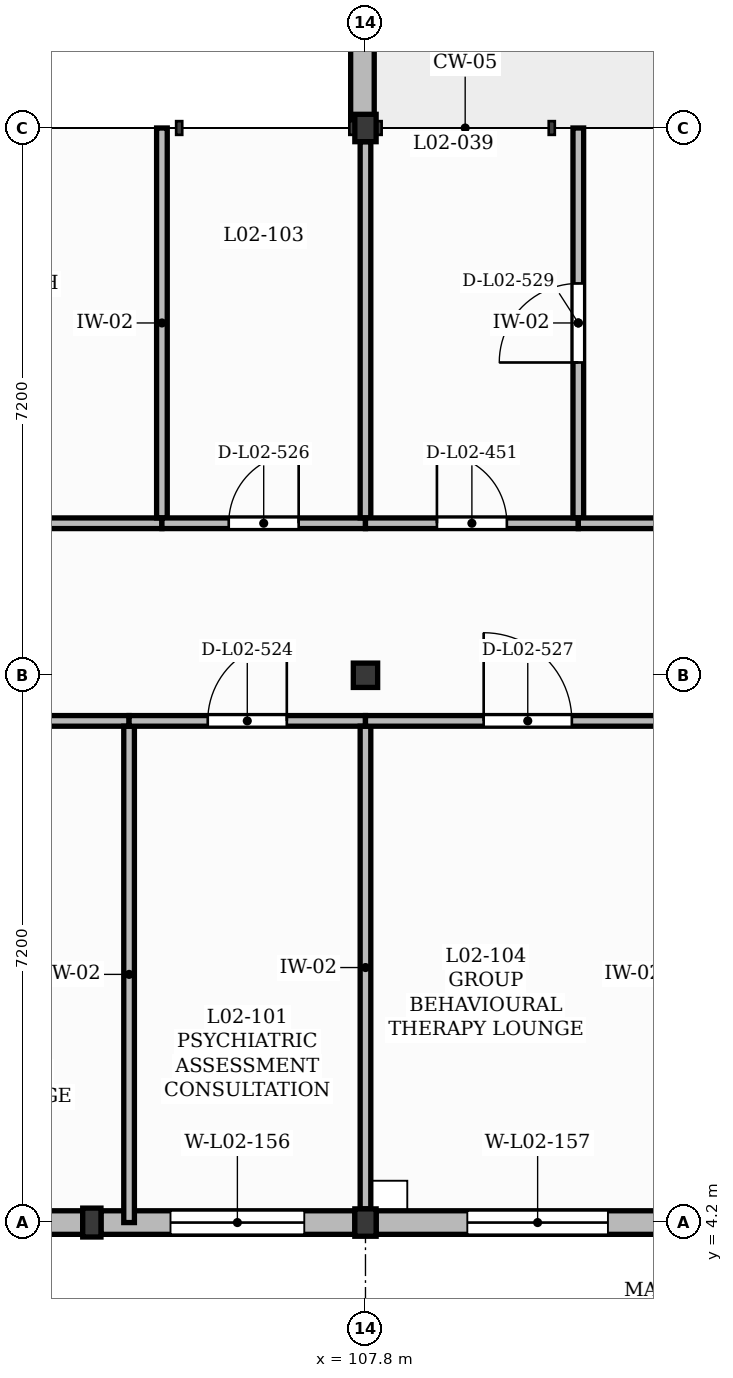
"""IFC4 building model, lengths in metres.
Left out: names, types, materials, properties, quantities, classifications, styles, units other than length and angle.
Written with IfcOpenShell. Run it as: python <this file> out.ifc"""

import sys

from ifc_helpers import new_model, si_unit, direction, frame, frame_2d, origin, origin_2d, place, context, subcontext, project, spatial, polyline, rectangle, outline, extrude, element, fill, save


model = new_model("IFC4")
c1 = context("Model", 3, precision=1e-05, world=origin(), true_north=direction((0.0, 1.0)))
c2 = subcontext(c1, "Body", "Model", "MODEL_VIEW")
j1 = project(units=[si_unit("LENGTHUNIT", "METRE"), si_unit("PLANEANGLEUNIT", "RADIAN")], contexts=[c1])
p1 = place(None, origin())
s1 = spatial("IfcSite", under=j1, at=p1, CompositionType="ELEMENT")
p2 = place(p1, origin())
s2 = spatial("IfcBuilding", under=s1, at=p2, CompositionType="ELEMENT")
p3 = place(p2, frame((0.0, 0.0, 9.0)))
s3 = spatial("IfcBuildingStorey", under=s2, at=p3, CompositionType="ELEMENT", Elevation=9.0)
p4 = place(p3, frame((107.8, 4.2, 0.0), z_axis=(0.0, 0.0, 1.0), x_axis=(1.0, 0.0, 0.0)))
e1 = element("IfcColumn", 1, at=p4, inside=s3, PredefinedType="COLUMN", context=c2, shape_type="SweptSolid", body=[
    extrude(rectangle(XDim=0.28, YDim=0.36, at=origin_2d()), origin(), (0.0, 0.0, 1.0), 3.98),
])
p5 = place(p3, frame((107.8, 11.4, 0.0), z_axis=(0.0, 0.0, 1.0), x_axis=(1.0, 0.0, 0.0)))
e2 = element("IfcColumn", 2, at=p5, inside=s3, PredefinedType="COLUMN", context=c2, shape_type="SweptSolid", body=[
    extrude(rectangle(XDim=0.32, YDim=0.32, at=origin_2d()), origin(), (0.0, 0.0, 1.0), 3.98),
])
p6 = place(p3, frame((107.8, 18.6, 0.0), z_axis=(0.0, 0.0, 1.0), x_axis=(1.0, 0.0, 0.0)))
e3 = element("IfcColumn", 3, at=p6, inside=s3, PredefinedType="COLUMN", context=c2, shape_type="SweptSolid", body=[
    extrude(rectangle(XDim=0.28, YDim=0.36, at=origin_2d()), origin(), (0.0, 0.0, 1.0), 3.98),
])
p7 = place(p3, frame((104.2, 4.2, 0.0), z_axis=(0.0, 0.0, 1.0), x_axis=(1.0, 0.0, 0.0)))
e4 = element("IfcColumn", 4, at=p7, inside=s3, PredefinedType="PILASTER", context=c2, shape_type="SweptSolid", body=[
    extrude(rectangle(XDim=0.24, YDim=0.38, at=origin_2d()), origin(), (0.0, 0.0, 1.0), 3.99),
])
p8 = place(p3, frame((100.76, 4.2, 0.0), z_axis=(0.0, 0.0, 1.0), x_axis=(1.0, 0.0, 0.0)))
e5 = element("IfcWall", 5, at=p8, inside=s3, PredefinedType="SOLIDWALL", context=c2, shape_type="SweptSolid", body=[
    extrude(rectangle(XDim=3.32, YDim=0.31, at=frame_2d((1.66, 0.0))), origin(), (0.0, 0.0, 1.0), 3.52),
])
p9 = place(p8, frame((0.85, 0.0, 1.0)))
e6 = element("IfcOpeningElement", 6, at=p9, cuts=e5, PredefinedType="OPENING", context=c2, shape_type="SweptSolid", body=[
    extrude(rectangle(XDim=1.62, YDim=1.95, at=frame_2d((0.81, 0.975))), frame((0.0, 0.165, 0.0), z_axis=(0.0, -1.0, 0.0), x_axis=(1.0, 0.0, 0.0)), (0.0, 0.0, 1.0), 0.33),
])
p10 = place(p3, frame((104.32, 4.2, 0.0), z_axis=(0.0, 0.0, 1.0), x_axis=(1.0, 0.0, 0.0)))
e7 = element("IfcWall", 7, at=p10, inside=s3, PredefinedType="SOLIDWALL", context=c2, shape_type="SweptSolid", body=[
    extrude(rectangle(XDim=3.34, YDim=0.31, at=frame_2d((1.67, 0.0))), origin(), (0.0, 0.0, 1.0), 3.52),
])
p11 = place(p10, frame((0.915, 0.0, 1.0)))
e8 = element("IfcOpeningElement", 8, at=p11, cuts=e7, PredefinedType="OPENING", context=c2, shape_type="SweptSolid", body=[
    extrude(rectangle(XDim=1.76, YDim=1.95, at=frame_2d((0.88, 0.975))), frame((0.0, 0.165, 0.0), z_axis=(0.0, -1.0, 0.0), x_axis=(1.0, 0.0, 0.0)), (0.0, 0.0, 1.0), 0.33),
])
p12 = place(p3, frame((107.94, 4.2, 0.0), z_axis=(0.0, 0.0, 1.0), x_axis=(1.0, 0.0, 0.0)))
e9 = element("IfcWall", 9, at=p12, inside=s3, PredefinedType="SOLIDWALL", context=c2, shape_type="SweptSolid", body=[
    extrude(rectangle(XDim=6.9, YDim=0.31, at=frame_2d((3.45, 0.0))), origin(), (0.0, 0.0, 1.0), 3.52),
])
p13 = place(p12, frame((1.2, 0.0, 1.5)))
e10 = element("IfcOpeningElement", 10, at=p13, cuts=e9, PredefinedType="OPENING", context=c2, shape_type="SweptSolid", body=[
    extrude(rectangle(XDim=1.85, YDim=1.25, at=frame_2d((0.925, 0.625))), frame((0.0, 0.165, 0.0), z_axis=(0.0, -1.0, 0.0), x_axis=(1.0, 0.0, 0.0)), (0.0, 0.0, 1.0), 0.33),
])
p14 = place(p12, frame((4.88, 0.0, 1.5)))
e11 = element("IfcOpeningElement", 11, at=p14, cuts=e9, PredefinedType="OPENING", context=c2, shape_type="SweptSolid", body=[
    extrude(rectangle(XDim=1.15, YDim=1.25, at=frame_2d((0.575, 0.625))), frame((0.0, 0.165, 0.0), z_axis=(0.0, -1.0, 0.0), x_axis=(1.0, 0.0, 0.0)), (0.0, 0.0, 1.0), 0.33),
])
p15 = place(p3, frame((107.76, 18.6, 0.0), z_axis=(0.0, 0.0, 1.0), x_axis=(0.0, 1.0, 0.0)))
e12 = element("IfcWall", 12, at=p15, inside=s3, PredefinedType="SOLIDWALL", context=c2, shape_type="SweptSolid", body=[
    extrude(outline(polyline([(0.0, 0.0), (8.6, 0.0), (8.6, 0.05), (4.3, 1.52), (0.0, 0.05), (0.0, 0.0)])), frame((0.0, 0.155, 0.0), z_axis=(0.0, -1.0, 0.0), x_axis=(1.0, 0.0, 0.0)), (0.0, 0.0, 1.0), 0.31),
])
p16 = place(p3, frame((100.6, 10.8, 0.0), z_axis=(0.0, 0.0, 1.0), x_axis=(1.0, 0.0, 0.0)))
e13 = element("IfcWall", 13, at=p16, inside=s3, PredefinedType="PARTITIONING", context=c2, shape_type="SweptSolid", body=[
    extrude(rectangle(XDim=4.09, YDim=0.14, at=frame_2d((2.045, 0.0))), origin(), (0.0, 0.0, 1.0), 3.96),
])
p17 = place(p16, frame((1.145, 0.0, 0.0)))
e14 = element("IfcOpeningElement", 14, at=p17, cuts=e13, PredefinedType="OPENING", context=c2, shape_type="SweptSolid", body=[
    extrude(rectangle(XDim=1.8, YDim=2.3, at=frame_2d((0.9, 1.15))), frame((0.0, 0.08, 0.0), z_axis=(0.0, -1.0, 0.0), x_axis=(1.0, 0.0, 0.0)), (0.0, 0.0, 1.0), 0.16),
])
p18 = place(p3, frame((100.6, 13.4, 0.0), z_axis=(0.0, 0.0, 1.0), x_axis=(1.0, 0.0, 0.0)))
e15 = element("IfcWall", 15, at=p18, inside=s3, PredefinedType="PARTITIONING", context=c2, shape_type="SweptSolid", body=[
    extrude(rectangle(XDim=4.522, YDim=0.14, at=frame_2d((2.261, 0.0))), origin(), (0.0, 0.0, 1.0), 3.96),
])
p19 = place(p18, frame((1.701, 0.0, 0.0)))
e16 = element("IfcOpeningElement", 16, at=p19, cuts=e15, PredefinedType="OPENING", context=c2, shape_type="SweptSolid", body=[
    extrude(rectangle(XDim=1.12, YDim=2.15, at=frame_2d((0.56, 1.075))), frame((0.0, 0.08, 0.0), z_axis=(0.0, -1.0, 0.0), x_axis=(1.0, 0.0, 0.0)), (0.0, 0.0, 1.0), 0.16),
])
p20 = place(p3, frame((104.69, 4.2, 0.0), z_axis=(0.0, 0.0, 1.0), x_axis=(0.0, 1.0, 0.0)))
e17 = element("IfcWall", 17, at=p20, inside=s3, PredefinedType="PARTITIONING", context=c2, shape_type="SweptSolid", body=[
    extrude(rectangle(XDim=6.53, YDim=0.14, at=frame_2d((3.265, 0.0))), origin(), (0.0, 0.0, 1.0), 3.96),
])
p21 = place(p3, frame((104.69, 10.8, 0.0), z_axis=(0.0, 0.0, 1.0), x_axis=(1.0, 0.0, 0.0)))
e18 = element("IfcWall", 18, at=p21, inside=s3, PredefinedType="PARTITIONING", context=c2, shape_type="SweptSolid", body=[
    extrude(rectangle(XDim=3.11, YDim=0.14, at=frame_2d((1.555, 0.0))), origin(), (0.0, 0.0, 1.0), 3.96),
])
p22 = place(p21, frame((1.035, 0.0, 0.0)))
e19 = element("IfcOpeningElement", 19, at=p22, cuts=e18, PredefinedType="OPENING", context=c2, shape_type="SweptSolid", body=[
    extrude(rectangle(XDim=1.04, YDim=2.1, at=frame_2d((0.52, 1.05))), frame((0.0, 0.08, 0.0), z_axis=(0.0, -1.0, 0.0), x_axis=(1.0, 0.0, 0.0)), (0.0, 0.0, 1.0), 0.16),
])
p23 = place(p3, frame((105.122, 13.47, 0.0), z_axis=(0.0, 0.0, 1.0), x_axis=(0.0, 1.0, 0.0)))
e20 = element("IfcWall", 20, at=p23, inside=s3, PredefinedType="PARTITIONING", context=c2, shape_type="SweptSolid", body=[
    extrude(rectangle(XDim=5.13, YDim=0.14, at=frame_2d((2.565, 0.0))), origin(), (0.0, 0.0, 1.0), 3.96),
])
p24 = place(p3, frame((105.122, 13.4, 0.0), z_axis=(0.0, 0.0, 1.0), x_axis=(1.0, 0.0, 0.0)))
e21 = element("IfcWall", 21, at=p24, inside=s3, PredefinedType="PARTITIONING", context=c2, shape_type="SweptSolid", body=[
    extrude(rectangle(XDim=2.678, YDim=0.14, at=frame_2d((1.339, 0.0))), origin(), (0.0, 0.0, 1.0), 3.96),
])
p25 = place(p24, frame((0.879, 0.0, 0.0)))
e22 = element("IfcOpeningElement", 22, at=p25, cuts=e21, PredefinedType="OPENING", context=c2, shape_type="SweptSolid", body=[
    extrude(rectangle(XDim=0.92, YDim=2.1, at=frame_2d((0.46, 1.05))), frame((0.0, 0.08, 0.0), z_axis=(0.0, -1.0, 0.0), x_axis=(1.0, 0.0, 0.0)), (0.0, 0.0, 1.0), 0.16),
])
p26 = place(p3, frame((107.8, 4.38, 0.0), z_axis=(0.0, 0.0, 1.0), x_axis=(0.0, 1.0, 0.0)))
e23 = element("IfcWall", 23, at=p26, inside=s3, PredefinedType="PARTITIONING", context=c2, shape_type="SweptSolid", body=[
    extrude(rectangle(XDim=6.35, YDim=0.14, at=frame_2d((3.175, 0.0))), origin(), (0.0, 0.0, 1.0), 3.52),
])
p27 = place(p3, frame((107.8, 10.8, 0.0), z_axis=(0.0, 0.0, 1.0), x_axis=(1.0, 0.0, 0.0)))
e24 = element("IfcWall", 24, at=p27, inside=s3, PredefinedType="PARTITIONING", context=c2, shape_type="SweptSolid", body=[
    extrude(rectangle(XDim=4.27, YDim=0.14, at=frame_2d((2.135, 0.0))), origin(), (0.0, 0.0, 1.0), 3.96),
])
p28 = place(p27, frame((1.555, 0.0, 0.0)))
e25 = element("IfcOpeningElement", 25, at=p28, cuts=e24, PredefinedType="OPENING", context=c2, shape_type="SweptSolid", body=[
    extrude(rectangle(XDim=1.16, YDim=2.1, at=frame_2d((0.58, 1.05))), frame((0.0, 0.08, 0.0), z_axis=(0.0, -1.0, 0.0), x_axis=(1.0, 0.0, 0.0)), (0.0, 0.0, 1.0), 0.16),
])
p29 = place(p3, frame((107.8, 13.47, 0.0), z_axis=(0.0, 0.0, 1.0), x_axis=(0.0, 1.0, 0.0)))
e26 = element("IfcWall", 26, at=p29, inside=s3, PredefinedType="PARTITIONING", context=c2, shape_type="SweptSolid", body=[
    extrude(rectangle(XDim=4.95, YDim=0.14, at=frame_2d((2.475, 0.0))), origin(), (0.0, 0.0, 1.0), 3.52),
])
p30 = place(p3, frame((107.8, 13.4, 0.0), z_axis=(0.0, 0.0, 1.0), x_axis=(1.0, 0.0, 0.0)))
e27 = element("IfcWall", 27, at=p30, inside=s3, PredefinedType="PARTITIONING", context=c2, shape_type="SweptSolid", body=[
    extrude(rectangle(XDim=2.8, YDim=0.14, at=frame_2d((1.4, 0.0))), origin(), (0.0, 0.0, 1.0), 3.96),
])
p31 = place(p30, frame((0.94, 0.0, 0.0)))
e28 = element("IfcOpeningElement", 28, at=p31, cuts=e27, PredefinedType="OPENING", context=c2, shape_type="SweptSolid", body=[
    extrude(rectangle(XDim=0.92, YDim=2.1, at=frame_2d((0.46, 1.05))), frame((0.0, 0.08, 0.0), z_axis=(0.0, -1.0, 0.0), x_axis=(1.0, 0.0, 0.0)), (0.0, 0.0, 1.0), 0.16),
])
p32 = place(p3, frame((110.6, 13.47, 0.0), z_axis=(0.0, 0.0, 1.0), x_axis=(0.0, 1.0, 0.0)))
e29 = element("IfcWall", 29, at=p32, inside=s3, PredefinedType="PARTITIONING", context=c2, shape_type="SweptSolid", body=[
    extrude(rectangle(XDim=5.13, YDim=0.14, at=frame_2d((2.565, 0.0))), origin(), (0.0, 0.0, 1.0), 3.96),
])
p33 = place(p32, frame((2.045, 0.0, 0.0)))
e30 = element("IfcOpeningElement", 30, at=p33, cuts=e29, PredefinedType="OPENING", context=c2, shape_type="SweptSolid", body=[
    extrude(rectangle(XDim=1.04, YDim=2.1, at=frame_2d((0.52, 1.05))), frame((0.0, 0.08, 0.0), z_axis=(0.0, -1.0, 0.0), x_axis=(1.0, 0.0, 0.0)), (0.0, 0.0, 1.0), 0.16),
])
p34 = place(p3, frame((110.6, 13.4, 0.0), z_axis=(0.0, 0.0, 1.0), x_axis=(1.0, 0.0, 0.0)))
e31 = element("IfcWall", 31, at=p34, inside=s3, PredefinedType="PARTITIONING", context=c2, shape_type="SweptSolid", body=[
    extrude(rectangle(XDim=4.4, YDim=0.14, at=frame_2d((2.2, 0.0))), origin(), (0.0, 0.0, 1.0), 3.96),
])
p35 = place(p11, origin())
e32 = element("IfcWindow", 32, at=p35, inside=s3, PartitioningType="DOUBLE_PANEL_VERTICAL", PredefinedType="WINDOW", context=c2, shape_type="SweptSolid", body=[
    extrude(rectangle(XDim=1.76, YDim=1.95, at=frame_2d((0.88, 0.975))), frame((0.0, 0.03, 0.0), z_axis=(0.0, -1.0, 0.0), x_axis=(1.0, 0.0, 0.0)), (0.0, 0.0, 1.0), 0.06),
])
fill(e8, e32)
p36 = place(p13, origin())
e33 = element("IfcWindow", 33, at=p36, inside=s3, PartitioningType="DOUBLE_PANEL_VERTICAL", PredefinedType="WINDOW", context=c2, shape_type="SweptSolid", body=[
    extrude(rectangle(XDim=1.85, YDim=1.25, at=frame_2d((0.925, 0.625))), frame((0.0, 0.03, 0.0), z_axis=(0.0, -1.0, 0.0), x_axis=(1.0, 0.0, 0.0)), (0.0, 0.0, 1.0), 0.06),
])
fill(e10, e33)
p37 = place(p31, origin())
e34 = element("IfcDoor", 34, at=p37, inside=s3, OperationType="SINGLE_SWING_LEFT", PredefinedType="DOOR", context=c2, shape_type="SweptSolid", body=[
    extrude(rectangle(XDim=0.92, YDim=2.1, at=frame_2d((0.46, 1.05))), frame((0.0, 0.025, 0.0), z_axis=(0.0, -1.0, 0.0), x_axis=(1.0, 0.0, 0.0)), (0.0, 0.0, 1.0), 0.05),
])
fill(e28, e34)
p38 = place(p22, origin())
e35 = element("IfcDoor", 35, at=p38, inside=s3, OperationType="SINGLE_SWING_RIGHT", PredefinedType="DOOR", context=c2, shape_type="SweptSolid", body=[
    extrude(rectangle(XDim=1.04, YDim=2.1, at=frame_2d((0.52, 1.05))), frame((0.0, 0.025, 0.0), z_axis=(0.0, -1.0, 0.0), x_axis=(1.0, 0.0, 0.0)), (0.0, 0.0, 1.0), 0.05),
])
fill(e19, e35)
p39 = place(p25, origin())
e36 = element("IfcDoor", 36, at=p39, inside=s3, OperationType="SINGLE_SWING_RIGHT", PredefinedType="DOOR", context=c2, shape_type="SweptSolid", body=[
    extrude(rectangle(XDim=0.92, YDim=2.1, at=frame_2d((0.46, 1.05))), frame((0.0, 0.025, 0.0), z_axis=(0.0, -1.0, 0.0), x_axis=(1.0, 0.0, 0.0)), (0.0, 0.0, 1.0), 0.05),
])
fill(e22, e36)
p40 = place(p28, origin())
e37 = element("IfcDoor", 37, at=p40, inside=s3, OperationType="SINGLE_SWING_LEFT", PredefinedType="DOOR", context=c2, shape_type="SweptSolid", body=[
    extrude(rectangle(XDim=1.16, YDim=2.1, at=frame_2d((0.58, 1.05))), frame((0.0, 0.025, 0.0), z_axis=(0.0, -1.0, 0.0), x_axis=(1.0, 0.0, 0.0)), (0.0, 0.0, 1.0), 0.05),
])
fill(e25, e37)
p41 = place(p33, origin())
e38 = element("IfcDoor", 38, at=p41, inside=s3, OperationType="SINGLE_SWING_LEFT", PredefinedType="DOOR", context=c2, shape_type="SweptSolid", body=[
    extrude(rectangle(XDim=1.04, YDim=2.1, at=frame_2d((0.52, 1.05))), frame((0.0, 0.025, 0.0), z_axis=(0.0, -1.0, 0.0), x_axis=(1.0, 0.0, 0.0)), (0.0, 0.0, 1.0), 0.05),
])
fill(e30, e38)
save(model, sys.argv[1])
